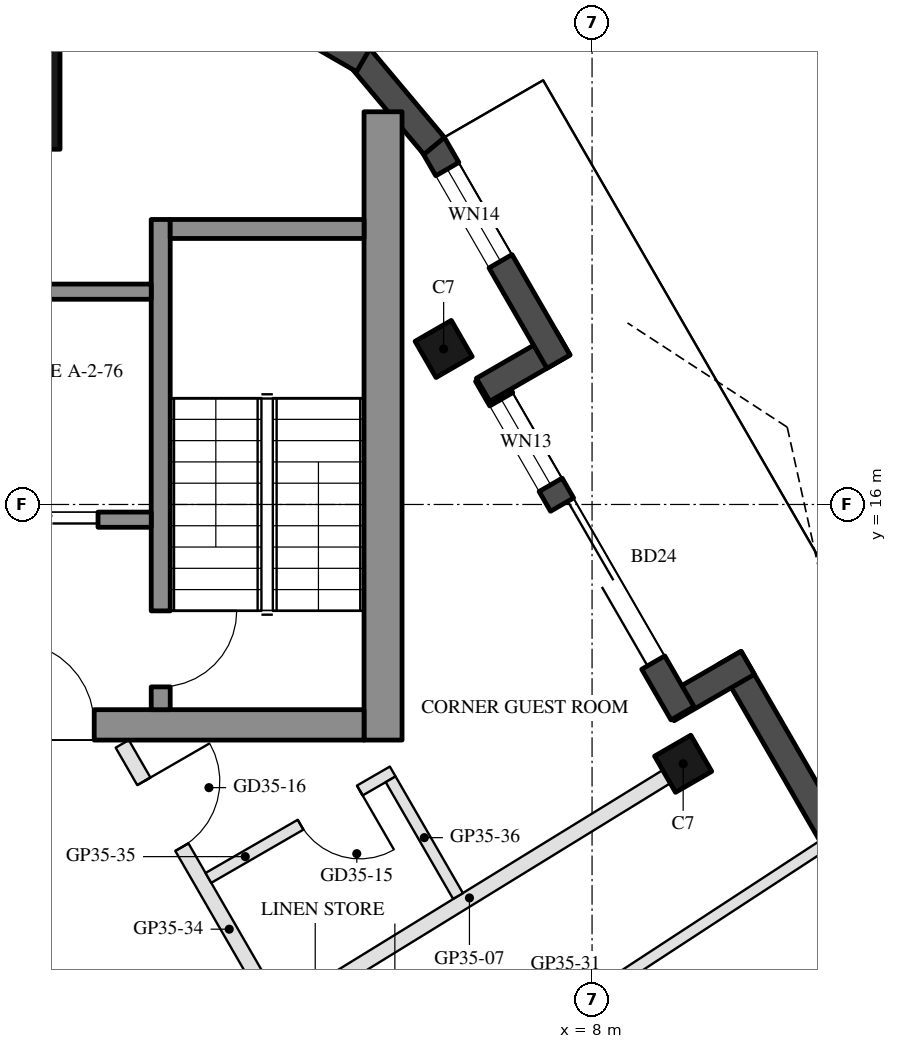
"""IFC4 building model, lengths in metres.
Left out: names, types, materials, properties, quantities, classifications, styles, units other than length and angle.
Written with IfcOpenShell. Run it as: python <this file> out.ifc"""

import sys

from ifc_helpers import new_model, si_unit, direction, frame, frame_2d, origin, origin_2d, place, context, subcontext, project, spatial, rectangle, hollow_rectangle, extrude, boolean, halfspace, element, fill, save


model = new_model("IFC4")
c1 = context("Model", 3, precision=1e-05, world=origin(), true_north=direction((0.0, 1.0)))
c2 = subcontext(c1, "Body", "Model", "MODEL_VIEW")
j1 = project(units=[si_unit("LENGTHUNIT", "METRE"), si_unit("PLANEANGLEUNIT", "RADIAN")], contexts=[c1])
p1 = place(None, origin())
s1 = spatial("IfcSite", under=j1, at=p1, CompositionType="ELEMENT")
p2 = place(p1, origin())
s2 = spatial("IfcBuilding", under=s1, at=p2, CompositionType="ELEMENT")
p3 = place(p2, frame((0.0, 0.0, 324.4)))
s3 = spatial("IfcBuildingStorey", under=s2, at=p3, CompositionType="ELEMENT", Elevation=324.4)
p4 = place(p3, frame((9.198, 12.588, 0.0), z_axis=(0.0, 0.0, 1.0), x_axis=(-0.5, 0.866025403784, 0.0)))
e1 = element("IfcColumn", 1, at=p4, inside=s3, PredefinedType="COLUMN", context=c2, shape_type="SweptSolid", body=[
    boolean("DIFFERENCE", boolean("DIFFERENCE", extrude(hollow_rectangle(XDim=0.55, YDim=0.55, WallThickness=0.025, at=origin_2d()), origin(), (0.0, 0.0, 1.0), 3.7), halfspace(frame((0.0, 0.0, 0.034), z_axis=(0.0, 0.0, 1.0), x_axis=(1.0, 0.0, 0.0)), True)), halfspace(frame((0.0, 0.0, 3.666), z_axis=(0.0, 0.0, 1.0), x_axis=(1.0, 0.0, 0.0)), False)),
])
p5 = place(p3, frame((6.047, 18.046, 0.0), z_axis=(0.0, 0.0, 1.0), x_axis=(-0.5, 0.866025403784, 0.0)))
e2 = element("IfcColumn", 2, at=p5, inside=s3, PredefinedType="COLUMN", context=c2, shape_type="SweptSolid", body=[
    boolean("DIFFERENCE", boolean("DIFFERENCE", extrude(hollow_rectangle(XDim=0.55, YDim=0.55, WallThickness=0.025, at=origin_2d()), origin(), (0.0, 0.0, 1.0), 3.7), halfspace(frame((0.0, 0.0, 0.04), z_axis=(0.0, 0.0, 1.0), x_axis=(1.0, 0.0, 0.0)), True)), halfspace(frame((0.0, 0.0, 3.66), z_axis=(0.0, 0.0, 1.0), x_axis=(1.0, 0.0, 0.0)), False)),
])
p6 = place(p3, frame((0.0, 21.674, 0.0), z_axis=(0.0, 0.0, 1.0), x_axis=(1.0, 0.0, 0.0)))
e3 = element("IfcColumn", 3, at=p6, inside=s3, PredefinedType="COLUMN", context=c2, shape_type="SweptSolid", body=[
    boolean("DIFFERENCE", boolean("DIFFERENCE", extrude(hollow_rectangle(XDim=2.0, YDim=2.0, WallThickness=0.05, at=origin_2d()), origin(), (0.0, 0.0, 1.0), 3.7), halfspace(frame((0.0, 0.0, 0.113), z_axis=(0.0, 0.0, 1.0), x_axis=(1.0, 0.0, 0.0)), True)), halfspace(frame((0.0, 0.0, 3.587), z_axis=(0.0, 0.0, 1.0), x_axis=(1.0, 0.0, 0.0)), False)),
])
p7 = place(p3, frame((13.861, 6.963, 0.0), z_axis=(0.0, 0.0, 1.0), x_axis=(-0.499985896038, 0.866033546558, 0.0)))
e4 = element("IfcWall", 4, at=p7, inside=s3, PredefinedType="SOLIDWALL", context=c2, shape_type="SweptSolid", body=[
    extrude(rectangle(XDim=8.102, YDim=0.35, at=frame_2d((4.051, 0.0))), origin(), (0.0, 0.0, 1.0), 3.55),
])
p8 = place(p7, frame((1.537, 0.0, 0.0)))
e5 = element("IfcOpeningElement", 5, at=p8, cuts=e4, PredefinedType="OPENING", context=c2, shape_type="SweptSolid", body=[
    extrude(rectangle(XDim=1.5, YDim=2.4, at=frame_2d((0.75, 1.2))), frame((0.0, 0.185, 0.0), z_axis=(0.0, -1.0, 0.0), x_axis=(1.0, 0.0, 0.0)), (0.0, 0.0, 1.0), 0.37),
])
p9 = place(p3, frame((10.049, 13.916, 0.0), z_axis=(0.0, 0.0, 1.0), x_axis=(-0.866005645448, -0.500034220881, 0.0)))
e6 = element("IfcWall", 6, at=p9, inside=s3, PredefinedType="SOLIDWALL", context=c2, shape_type="SweptSolid", body=[
    extrude(rectangle(XDim=1.22, YDim=0.35, at=frame_2d((0.61, 0.0))), origin(), (0.0, 0.0, 1.0), 3.55),
])
p10 = place(p3, frame((9.19, 13.253, 0.0), z_axis=(0.0, 0.0, 1.0), x_axis=(-0.499963552308, 0.866046445846, 0.0)))
e7 = element("IfcWall", 7, at=p10, inside=s3, PredefinedType="SOLIDWALL", context=c2, shape_type="SweptSolid", body=[
    extrude(rectangle(XDim=5.143, YDim=0.35, at=frame_2d((2.571, 0.0))), origin(), (0.0, 0.0, 1.0), 3.55),
])
p11 = place(p10, frame((0.77, 0.0, 0.0)))
e8 = element("IfcOpeningElement", 8, at=p11, cuts=e7, PredefinedType="OPENING", context=c2, shape_type="SweptSolid", body=[
    extrude(rectangle(XDim=2.4, YDim=2.4, at=frame_2d((1.2, 1.2))), frame((0.0, 0.185, 0.0), z_axis=(0.0, -1.0, 0.0), x_axis=(1.0, 0.0, 0.0)), (0.0, 0.0, 1.0), 0.37),
])
p12 = place(p10, frame((3.47, 0.0, 0.3)))
e9 = element("IfcOpeningElement", 9, at=p12, cuts=e7, PredefinedType="OPENING", context=c2, shape_type="SweptSolid", body=[
    extrude(rectangle(XDim=1.3, YDim=2.65, at=frame_2d((0.65, 1.325))), frame((0.0, 0.185, 0.0), z_axis=(0.0, -1.0, 0.0), x_axis=(1.0, 0.0, 0.0)), (0.0, 0.0, 1.0), 0.37),
])
p13 = place(p3, frame((6.566, 17.509, 0.0), z_axis=(0.0, 0.0, 1.0), x_axis=(0.866005645448, 0.500034220881, 0.0)))
e10 = element("IfcWall", 10, at=p13, inside=s3, PredefinedType="SOLIDWALL", context=c2, shape_type="SweptSolid", body=[
    extrude(rectangle(XDim=1.22, YDim=0.35, at=frame_2d((0.61, 0.0))), origin(), (0.0, 0.0, 1.0), 3.55),
])
p14 = place(p3, frame((7.558, 17.879, 0.0), z_axis=(0.0, 0.0, 1.0), x_axis=(-0.499967508769, 0.866044161793, 0.0)))
e11 = element("IfcWall", 11, at=p14, inside=s3, PredefinedType="SOLIDWALL", context=c2, shape_type="SweptSolid", body=[
    extrude(rectangle(XDim=3.306, YDim=0.35, at=frame_2d((1.653, 0.0))), origin(), (0.0, 0.0, 1.0), 3.55),
])
p15 = place(p14, frame((1.525, 0.0, 0.3)))
e12 = element("IfcOpeningElement", 12, at=p15, cuts=e11, PredefinedType="OPENING", context=c2, shape_type="SweptSolid", body=[
    extrude(rectangle(XDim=1.4, YDim=2.65, at=frame_2d((0.7, 1.325))), frame((0.0, 0.185, 0.0), z_axis=(0.0, -1.0, 0.0), x_axis=(1.0, 0.0, 0.0)), (0.0, 0.0, 1.0), 0.37),
])
for number, where, z_axis, x_axis in (
    (13, (5.923, 20.718, 0.0), (0.0, 0.0, 1.0), (-0.643, 0.766, 0.0)),
    (14, (4.99, 21.846, 0.0), (0.0, 0.0, 1.0), (-0.866, 0.5, 0.0)),
):
    element("IfcWall", number, at=place(p3, frame(where, z_axis=z_axis, x_axis=x_axis)), inside=s3, PredefinedType="SOLIDWALL", context=c2, shape_type="SweptSolid", body=[
        extrude(rectangle(XDim=1.524, YDim=0.35, at=frame_2d((0.762, 0.0))), origin(), (0.0, 0.0, 1.0), 3.55),
    ])
p16 = place(p3, frame((5.25, 12.9, 0.0), z_axis=(0.0, 0.0, 1.0), x_axis=(0.0, 1.0, 0.0)))
e15 = element("IfcWall", 15, at=p16, inside=s3, PredefinedType="SHEAR", context=c2, shape_type="SweptSolid", body=[
    extrude(rectangle(XDim=8.267, YDim=0.5, at=frame_2d((4.134, 0.0))), origin(), (0.0, 0.0, 1.0), 3.5),
])
p17 = place(p3, frame((5.0, 13.1, 0.0), z_axis=(0.0, 0.0, 1.0), x_axis=(-1.0, 0.0, 0.0)))
e16 = element("IfcWall", 16, at=p17, inside=s3, PredefinedType="SHEAR", context=c2, shape_type="SweptSolid", body=[
    extrude(rectangle(XDim=10.0, YDim=0.4, at=frame_2d((5.0, 0.0))), origin(), (0.0, 0.0, 1.0), 3.5),
])
p18 = place(p17, frame((3.55, 0.0, 0.0)))
e17 = element("IfcOpeningElement", 17, at=p18, cuts=e16, PredefinedType="OPENING", context=c2, shape_type="SweptSolid", body=[
    extrude(rectangle(XDim=1.1, YDim=2.1, at=frame_2d((0.55, 1.05))), frame((0.0, 0.21, 0.0), z_axis=(0.0, -1.0, 0.0), x_axis=(1.0, 0.0, 0.0)), (0.0, 0.0, 1.0), 0.42),
])
p19 = place(p17, frame((5.85, 0.0, 0.0)))
e18 = element("IfcOpeningElement", 18, at=p19, cuts=e16, PredefinedType="OPENING", context=c2, shape_type="SweptSolid", body=[
    extrude(rectangle(XDim=1.4, YDim=2.1, at=frame_2d((0.7, 1.05))), frame((0.0, 0.21, 0.0), z_axis=(0.0, -1.0, 0.0), x_axis=(1.0, 0.0, 0.0)), (0.0, 0.0, 1.0), 0.42),
])
p20 = place(p3, frame((2.325, 13.3, 0.0), z_axis=(0.0, 0.0, 1.0), x_axis=(0.0, 1.0, 0.0)))
e19 = element("IfcWall", 19, at=p20, inside=s3, PredefinedType="SHEAR", context=c2, shape_type="SweptSolid", body=[
    extrude(rectangle(XDim=6.45, YDim=0.25, at=frame_2d((3.225, 0.0))), origin(), (0.0, 0.0, 1.0), 3.5),
])
p21 = place(p20, frame((0.3, 0.0, 0.0)))
e20 = element("IfcOpeningElement", 20, at=p21, cuts=e19, PredefinedType="OPENING", context=c2, shape_type="SweptSolid", body=[
    extrude(rectangle(XDim=1.0, YDim=2.1, at=frame_2d((0.5, 1.05))), frame((0.0, 0.135, 0.0), z_axis=(0.0, -1.0, 0.0), x_axis=(1.0, 0.0, 0.0)), (0.0, 0.0, 1.0), 0.27),
])
p22 = place(p3, frame((5.0, 19.625, 0.0), z_axis=(0.0, 0.0, 1.0), x_axis=(-1.0, 0.0, 0.0)))
e21 = element("IfcWall", 21, at=p22, inside=s3, PredefinedType="SHEAR", context=c2, shape_type="SweptSolid", body=[
    extrude(rectangle(XDim=2.55, YDim=0.25, at=frame_2d((1.275, 0.0))), origin(), (0.0, 0.0, 1.0), 3.5),
])
p23 = place(p3, frame((2.2, 18.8, 0.0), z_axis=(0.0, 0.0, 1.0), x_axis=(-1.0, 0.0, 0.0)))
e22 = element("IfcWall", 22, at=p23, inside=s3, PredefinedType="SHEAR", context=c2, shape_type="SweptSolid", body=[
    extrude(rectangle(XDim=2.8, YDim=0.2, at=frame_2d((1.4, 0.0))), origin(), (0.0, 0.0, 1.0), 3.5),
])
p24 = place(p3, frame((2.2, 15.8, 0.0), z_axis=(0.0, 0.0, 1.0), x_axis=(-1.0, 0.0, 0.0)))
e23 = element("IfcWall", 23, at=p24, inside=s3, PredefinedType="SHEAR", context=c2, shape_type="SweptSolid", body=[
    extrude(rectangle(XDim=2.8, YDim=0.2, at=frame_2d((1.4, 0.0))), origin(), (0.0, 0.0, 1.0), 3.5),
])
p25 = place(p24, frame((0.7, 0.0, 0.0)))
e24 = element("IfcOpeningElement", 24, at=p25, cuts=e23, PredefinedType="OPENING", context=c2, shape_type="SweptSolid", body=[
    extrude(rectangle(XDim=1.2, YDim=2.1, at=frame_2d((0.6, 1.05))), frame((0.0, 0.11, 0.0), z_axis=(0.0, -1.0, 0.0), x_axis=(1.0, 0.0, 0.0)), (0.0, 0.0, 1.0), 0.22),
])
p26 = place(p3, frame((11.959, 9.907, 0.0), z_axis=(0.0, 0.0, 1.0), x_axis=(-0.821566459399, -0.570112754454, 0.0)))
e25 = element("IfcWall", 25, at=p26, inside=s3, PredefinedType="PARTITIONING", context=c2, shape_type="SweptSolid", body=[
    extrude(rectangle(XDim=7.436, YDim=0.2, at=frame_2d((3.718, 0.0))), origin(), (0.0, 0.0, 1.0), 3.1),
])
p27 = place(p3, frame((8.979, 12.418, 0.0), z_axis=(0.0, 0.0, 1.0), x_axis=(-0.851645923852, -0.524117563516, 0.0)))
e26 = element("IfcWall", 26, at=p27, inside=s3, PredefinedType="PARTITIONING", context=c2, shape_type="SweptSolid", body=[
    extrude(rectangle(XDim=6.088, YDim=0.2, at=frame_2d((3.044, 0.0))), origin(), (0.0, 0.0, 1.0), 3.15),
])
p28 = place(p3, frame((11.034, 11.51, 0.0), z_axis=(0.0, 0.0, 1.0), x_axis=(-0.836911659743, -0.54733798862, 0.0)))
e27 = element("IfcWall", 27, at=p28, inside=s3, PredefinedType="PARTITIONING", context=c2, shape_type="SweptSolid", body=[
    extrude(rectangle(XDim=7.422, YDim=0.15, at=frame_2d((3.711, 0.0))), origin(), (0.0, 0.0, 1.0), 3.1),
])
p29 = place(p3, frame((1.819, 12.85, 0.0), z_axis=(0.0, 0.0, 1.0), x_axis=(0.499997437312, -0.866026883348, 0.0)))
e28 = element("IfcWall", 28, at=p29, inside=s3, PredefinedType="PARTITIONING", context=c2, shape_type="SweptSolid", body=[
    extrude(rectangle(XDim=4.022, YDim=0.2, at=frame_2d((2.011, 0.0))), origin(), (0.0, 0.0, 1.0), 3.15),
])
p30 = place(p29, frame((0.569, 0.0, 0.0)))
e29 = element("IfcOpeningElement", 29, at=p30, cuts=e28, PredefinedType="OPENING", context=c2, shape_type="SweptSolid", body=[
    extrude(rectangle(XDim=1.0, YDim=2.1, at=frame_2d((0.5, 1.05))), frame((0.0, 0.11, 0.0), z_axis=(0.0, -1.0, 0.0), x_axis=(1.0, 0.0, 0.0)), (0.0, 0.0, 1.0), 0.22),
])
p31 = place(p3, frame((5.377, 12.487, 0.0), z_axis=(0.0, 0.0, 1.0), x_axis=(-0.865996816683, -0.500049511043, 0.0)))
e30 = element("IfcWall", 30, at=p31, inside=s3, PredefinedType="PARTITIONING", context=c2, shape_type="SweptSolid", body=[
    extrude(rectangle(XDim=2.8, YDim=0.15, at=frame_2d((1.4, 0.0))), origin(), (0.0, 0.0, 1.0), 3.55),
])
p32 = place(p31, frame((0.5, 0.0, 0.0)))
e31 = element("IfcOpeningElement", 31, at=p32, cuts=e30, PredefinedType="OPENING", context=c2, shape_type="SweptSolid", body=[
    extrude(rectangle(XDim=0.9, YDim=2.1, at=frame_2d((0.45, 1.05))), frame((0.0, 0.085, 0.0), z_axis=(0.0, -1.0, 0.0), x_axis=(1.0, 0.0, 0.0)), (0.0, 0.0, 1.0), 0.17),
])
p33 = place(p3, frame((6.237, 10.848, 0.0), z_axis=(0.0, 0.0, 1.0), x_axis=(-0.500091824179, 0.865972382579, 0.0)))
e32 = element("IfcWall", 32, at=p33, inside=s3, PredefinedType="PARTITIONING", context=c2, shape_type="SweptSolid", body=[
    extrude(rectangle(XDim=1.774, YDim=0.15, at=frame_2d((0.887, 0.0))), origin(), (0.0, 0.0, 1.0), 3.15),
])
p34 = place(p11, frame((2.4, 0.0, 0.0), z_axis=(0.0, 0.0, 1.0), x_axis=(-1.0, 0.0, 0.0)))
e33 = element("IfcDoor", 33, at=p34, inside=s3, OperationType="SLIDING_TO_LEFT", PredefinedType="DOOR", context=c2, shape_type="SweptSolid", body=[
    extrude(rectangle(XDim=2.4, YDim=2.4, at=frame_2d((1.2, 1.2))), frame((0.0, 0.025, 0.0), z_axis=(0.0, -1.0, 0.0), x_axis=(1.0, 0.0, 0.0)), (0.0, 0.0, 1.0), 0.05),
])
fill(e8, e33)
p35 = place(p12, origin())
e34 = element("IfcWindow", 34, at=p35, inside=s3, PartitioningType="SINGLE_PANEL", PredefinedType="WINDOW", context=c2, shape_type="SweptSolid", body=[
    extrude(rectangle(XDim=1.3, YDim=2.65, at=frame_2d((0.65, 1.325))), frame((0.0, 0.03, 0.0), z_axis=(0.0, -1.0, 0.0), x_axis=(1.0, 0.0, 0.0)), (0.0, 0.0, 1.0), 0.06),
])
fill(e9, e34)
p36 = place(p15, origin())
e35 = element("IfcWindow", 35, at=p36, inside=s3, PartitioningType="SINGLE_PANEL", PredefinedType="WINDOW", context=c2, shape_type="SweptSolid", body=[
    extrude(rectangle(XDim=1.4, YDim=2.65, at=frame_2d((0.7, 1.325))), frame((0.0, 0.03, 0.0), z_axis=(0.0, -1.0, 0.0), x_axis=(1.0, 0.0, 0.0)), (0.0, 0.0, 1.0), 0.06),
])
fill(e12, e35)
p37 = place(p25, origin())
e36 = element("IfcDoor", 36, at=p37, inside=s3, OperationType="DOUBLE_DOOR_SLIDING", PredefinedType="DOOR", context=c2, shape_type="SweptSolid", body=[
    extrude(rectangle(XDim=1.2, YDim=2.1, at=frame_2d((0.6, 1.05))), frame((0.0, 0.025, 0.0), z_axis=(0.0, -1.0, 0.0), x_axis=(1.0, 0.0, 0.0)), (0.0, 0.0, 1.0), 0.05),
])
fill(e24, e36)
p38 = place(p18, frame((1.1, 0.0, 0.0), z_axis=(0.0, 0.0, 1.0), x_axis=(-1.0, 0.0, 0.0)))
e37 = element("IfcDoor", 37, at=p38, inside=s3, OperationType="SINGLE_SWING_LEFT", PredefinedType="DOOR", context=c2, shape_type="SweptSolid", body=[
    extrude(rectangle(XDim=1.1, YDim=2.1, at=frame_2d((0.55, 1.05))), frame((0.0, 0.025, 0.0), z_axis=(0.0, -1.0, 0.0), x_axis=(1.0, 0.0, 0.0)), (0.0, 0.0, 1.0), 0.05),
])
fill(e17, e37)
p39 = place(p21, frame((1.0, 0.0, 0.0), z_axis=(0.0, 0.0, 1.0), x_axis=(-1.0, 0.0, 0.0)))
e38 = element("IfcDoor", 38, at=p39, inside=s3, OperationType="SINGLE_SWING_LEFT", PredefinedType="DOOR", context=c2, shape_type="SweptSolid", body=[
    extrude(rectangle(XDim=1.0, YDim=2.1, at=frame_2d((0.5, 1.05))), frame((0.0, 0.025, 0.0), z_axis=(0.0, -1.0, 0.0), x_axis=(1.0, 0.0, 0.0)), (0.0, 0.0, 1.0), 0.05),
])
fill(e20, e38)
p40 = place(p32, origin())
e39 = element("IfcDoor", 39, at=p40, inside=s3, OperationType="SINGLE_SWING_LEFT", PredefinedType="DOOR", context=c2, shape_type="SweptSolid", body=[
    extrude(rectangle(XDim=0.9, YDim=2.1, at=frame_2d((0.45, 1.05))), frame((0.0, 0.025, 0.0), z_axis=(0.0, -1.0, 0.0), x_axis=(1.0, 0.0, 0.0)), (0.0, 0.0, 1.0), 0.05),
])
fill(e31, e39)
p41 = place(p30, origin())
e40 = element("IfcDoor", 40, at=p41, inside=s3, OperationType="SINGLE_SWING_LEFT", PredefinedType="DOOR", context=c2, shape_type="SweptSolid", body=[
    extrude(rectangle(XDim=1.0, YDim=2.1, at=frame_2d((0.5, 1.05))), frame((0.0, 0.025, 0.0), z_axis=(0.0, -1.0, 0.0), x_axis=(1.0, 0.0, 0.0)), (0.0, 0.0, 1.0), 0.05),
])
fill(e29, e40)
save(model, sys.argv[1])
